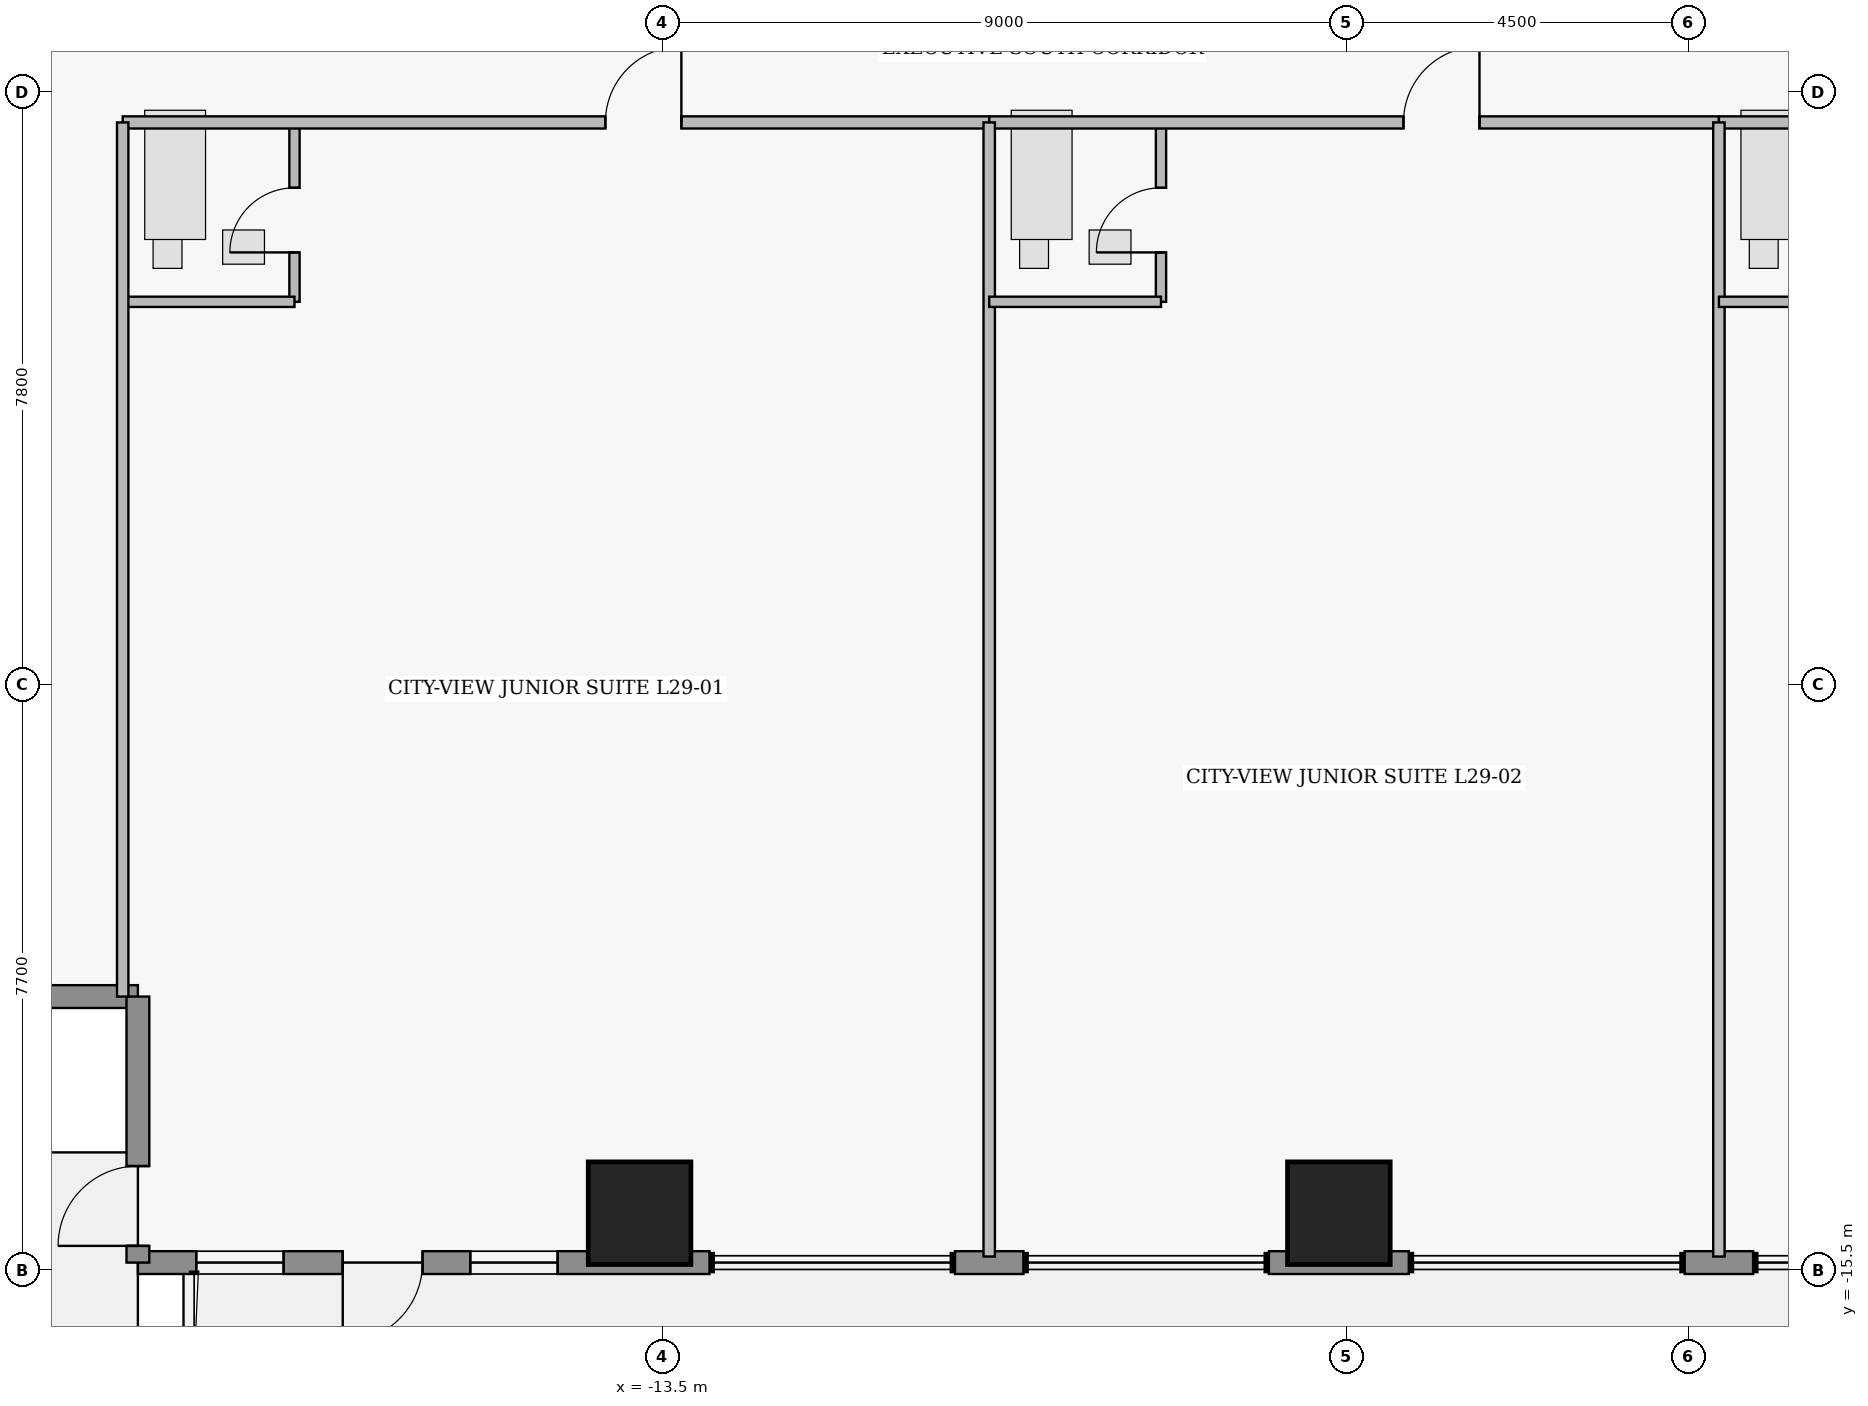
"""IFC4 building model, lengths in metres.
Left out: names, types, materials, properties, quantities, classifications, styles, units other than length and angle.
Written with IfcOpenShell. Run it as: python <this file> out.ifc"""

import sys

from ifc_helpers import new_model, si_unit, direction, frame, frame_2d, origin, origin_2d, place, context, subcontext, project, spatial, rectangle, extrude, element, fill, save


model = new_model("IFC4")
c1 = context("Model", 3, precision=1e-05, world=origin(), true_north=direction((0.0, 1.0)))
c2 = subcontext(c1, "Body", "Model", "MODEL_VIEW")
j1 = project(units=[si_unit("LENGTHUNIT", "METRE"), si_unit("PLANEANGLEUNIT", "RADIAN")], contexts=[c1])
p1 = place(None, origin())
s1 = spatial("IfcSite", under=j1, at=p1, CompositionType="ELEMENT")
p2 = place(p1, origin())
s2 = spatial("IfcBuilding", under=s1, at=p2, CompositionType="ELEMENT")
p3 = place(p2, frame((0.0, 0.0, 117.55)))
s3 = spatial("IfcBuildingStorey", under=s2, at=p3, CompositionType="ELEMENT", Elevation=117.55)
for number, where, z_axis, x_axis in (
    (1, (-13.8, -14.75, 0.0), (0.0, 0.0, 1.0), (1.0, 0.0, 0.0)),
    (2, (-4.6, -14.75, 0.0), (0.0, 0.0, 1.0), (1.0, 0.0, 0.0)),
):
    element("IfcColumn", number, at=place(p3, frame(where, z_axis=z_axis, x_axis=x_axis)), inside=s3, PredefinedType="COLUMN", context=c2, shape_type="SweptSolid", body=[
        extrude(rectangle(XDim=1.35, YDim=1.35, at=origin_2d()), origin(), (0.0, 0.0, 1.0), 3.65),
    ])
p4 = place(p3, frame((-20.4, -11.9, 0.0), z_axis=(0.0, 0.0, 1.0), x_axis=(-1.0, 0.0, 0.0)))
e3 = element("IfcWall", 3, at=p4, inside=s3, PredefinedType="STANDARD", context=c2, shape_type="SweptSolid", body=[
    extrude(rectangle(XDim=3.5, YDim=0.3, at=frame_2d((1.75, 0.0))), origin(), (0.0, 0.0, 1.0), 3.43),
])
p5 = place(p3, frame((0.85, -15.4, 0.0), z_axis=(0.0, 0.0, 1.0), x_axis=(-1.0, 0.0, 0.0)))
e4 = element("IfcWall", 4, at=p5, inside=s3, PredefinedType="STANDARD", context=c2, shape_type="SweptSolid", body=[
    extrude(rectangle(XDim=0.9, YDim=0.3, at=frame_2d((0.45, 0.0))), origin(), (0.0, 0.0, 1.0), 3.43),
])
p6 = place(p3, frame((-3.68, -15.4, 0.0), z_axis=(0.0, 0.0, 1.0), x_axis=(-1.0, 0.0, 0.0)))
e5 = element("IfcWall", 5, at=p6, inside=s3, PredefinedType="STANDARD", context=c2, shape_type="SweptSolid", body=[
    extrude(rectangle(XDim=1.84, YDim=0.3, at=frame_2d((0.92, 0.0))), origin(), (0.0, 0.0, 1.0), 3.43),
])
p7 = place(p3, frame((-8.75, -15.4, 0.0), z_axis=(0.0, 0.0, 1.0), x_axis=(-1.0, 0.0, 0.0)))
e6 = element("IfcWall", 6, at=p7, inside=s3, PredefinedType="STANDARD", context=c2, shape_type="SweptSolid", body=[
    extrude(rectangle(XDim=0.9, YDim=0.3, at=frame_2d((0.45, 0.0))), origin(), (0.0, 0.0, 1.0), 3.43),
])
p8 = place(p3, frame((-12.88, -15.4, 0.0), z_axis=(0.0, 0.0, 1.0), x_axis=(-1.0, 0.0, 0.0)))
e7 = element("IfcWall", 7, at=p8, inside=s3, PredefinedType="STANDARD", context=c2, shape_type="SweptSolid", body=[
    extrude(rectangle(XDim=7.52, YDim=0.3, at=frame_2d((3.76, 0.0))), origin(), (0.0, 0.0, 1.0), 3.43),
])
p9 = place(p8, frame((3.775, 0.0, 0.0)))
e8 = element("IfcOpeningElement", 8, at=p9, cuts=e7, PredefinedType="OPENING", context=c2, shape_type="SweptSolid", body=[
    extrude(rectangle(XDim=1.05, YDim=2.2, at=frame_2d((0.525, 1.1))), frame((0.0, 0.16, 0.0), z_axis=(0.0, -1.0, 0.0), x_axis=(1.0, 0.0, 0.0)), (0.0, 0.0, 1.0), 0.32),
])
p10 = place(p8, frame((1.998, 0.0, 0.95)))
e9 = element("IfcOpeningElement", 9, at=p10, cuts=e7, PredefinedType="OPENING", context=c2, shape_type="SweptSolid", body=[
    extrude(rectangle(XDim=1.15, YDim=1.55, at=frame_2d((0.575, 0.775))), frame((0.0, 0.16, 0.0), z_axis=(0.0, -1.0, 0.0), x_axis=(1.0, 0.0, 0.0)), (0.0, 0.0, 1.0), 0.32),
])
p11 = place(p8, frame((5.603, 0.0, 0.95)))
e10 = element("IfcOpeningElement", 10, at=p11, cuts=e7, PredefinedType="OPENING", context=c2, shape_type="SweptSolid", body=[
    extrude(rectangle(XDim=1.15, YDim=1.55, at=frame_2d((0.575, 0.775))), frame((0.0, 0.16, 0.0), z_axis=(0.0, -1.0, 0.0), x_axis=(1.0, 0.0, 0.0)), (0.0, 0.0, 1.0), 0.32),
])
p12 = place(p3, frame((-20.4, -15.4, 0.0), z_axis=(0.0, 0.0, 1.0), x_axis=(0.0, 1.0, 0.0)))
e11 = element("IfcWall", 11, at=p12, inside=s3, PredefinedType="STANDARD", context=c2, shape_type="SweptSolid", body=[
    extrude(rectangle(XDim=3.5, YDim=0.3, at=frame_2d((1.75, 0.0))), origin(), (0.0, 0.0, 1.0), 3.43),
])
p13 = place(p12, frame((0.22, 0.0, 0.0)))
e12 = element("IfcOpeningElement", 12, at=p13, cuts=e11, PredefinedType="OPENING", context=c2, shape_type="SweptSolid", body=[
    extrude(rectangle(XDim=1.05, YDim=2.2, at=frame_2d((0.525, 1.1))), frame((0.0, 0.16, 0.0), z_axis=(0.0, -1.0, 0.0), x_axis=(1.0, 0.0, 0.0)), (0.0, 0.0, 1.0), 0.32),
])
p14 = place(p3, frame((-18.34, -2.76, 0.0), z_axis=(0.0, 0.0, 1.0), x_axis=(0.0, 1.0, 0.0)))
e13 = element("IfcWall", 13, at=p14, inside=s3, PredefinedType="PLUMBINGWALL", context=c2, shape_type="SweptSolid", body=[
    extrude(rectangle(XDim=2.36, YDim=0.135, at=frame_2d((1.18, 0.0))), origin(), (0.0, 0.0, 1.0), 3.43),
])
p15 = place(p14, frame((0.65, 0.0, 0.0)))
e14 = element("IfcOpeningElement", 14, at=p15, cuts=e13, PredefinedType="OPENING", context=c2, shape_type="SweptSolid", body=[
    extrude(rectangle(XDim=0.85, YDim=2.1, at=frame_2d((0.425, 1.05))), frame((0.0, 0.077, 0.0), z_axis=(0.0, -1.0, 0.0), x_axis=(1.0, 0.0, 0.0)), (0.0, 0.0, 1.0), 0.155),
])
p16 = place(p3, frame((-20.6, -0.4, 0.0), z_axis=(0.0, 0.0, 1.0), x_axis=(1.0, 0.0, 0.0)))
e15 = element("IfcWall", 15, at=p16, inside=s3, PredefinedType="PARTITIONING", context=c2, shape_type="SweptSolid", body=[
    extrude(rectangle(XDim=11.4, YDim=0.16, at=frame_2d((5.7, 0.0))), origin(), (0.0, 0.0, 1.0), 3.43),
])
p17 = place(p16, frame((6.35, 0.0, 0.0)))
e16 = element("IfcOpeningElement", 16, at=p17, cuts=e15, PredefinedType="OPENING", context=c2, shape_type="SweptSolid", body=[
    extrude(rectangle(XDim=1.0, YDim=2.15, at=frame_2d((0.5, 1.075))), frame((0.0, 0.09, 0.0), z_axis=(0.0, -1.0, 0.0), x_axis=(1.0, 0.0, 0.0)), (0.0, 0.0, 1.0), 0.18),
])
p18 = place(p3, frame((-6.94, -2.76, 0.0), z_axis=(0.0, 0.0, 1.0), x_axis=(0.0, 1.0, 0.0)))
e17 = element("IfcWall", 17, at=p18, inside=s3, PredefinedType="PLUMBINGWALL", context=c2, shape_type="SweptSolid", body=[
    extrude(rectangle(XDim=2.36, YDim=0.135, at=frame_2d((1.18, 0.0))), origin(), (0.0, 0.0, 1.0), 3.43),
])
p19 = place(p18, frame((0.65, 0.0, 0.0)))
e18 = element("IfcOpeningElement", 18, at=p19, cuts=e17, PredefinedType="OPENING", context=c2, shape_type="SweptSolid", body=[
    extrude(rectangle(XDim=0.85, YDim=2.1, at=frame_2d((0.425, 1.05))), frame((0.0, 0.077, 0.0), z_axis=(0.0, -1.0, 0.0), x_axis=(1.0, 0.0, 0.0)), (0.0, 0.0, 1.0), 0.155),
])
p20 = place(p3, frame((-9.2, -0.4, 0.0), z_axis=(0.0, 0.0, 1.0), x_axis=(1.0, 0.0, 0.0)))
e19 = element("IfcWall", 19, at=p20, inside=s3, PredefinedType="PARTITIONING", context=c2, shape_type="SweptSolid", body=[
    extrude(rectangle(XDim=9.6, YDim=0.16, at=frame_2d((4.8, 0.0))), origin(), (0.0, 0.0, 1.0), 3.43),
])
p21 = place(p20, frame((5.45, 0.0, 0.0)))
e20 = element("IfcOpeningElement", 20, at=p21, cuts=e19, PredefinedType="OPENING", context=c2, shape_type="SweptSolid", body=[
    extrude(rectangle(XDim=1.0, YDim=2.15, at=frame_2d((0.5, 1.075))), frame((0.0, 0.09, 0.0), z_axis=(0.0, -1.0, 0.0), x_axis=(1.0, 0.0, 0.0)), (0.0, 0.0, 1.0), 0.18),
])
p22 = place(p3, frame((0.4, -0.4, 0.0), z_axis=(0.0, 0.0, 1.0), x_axis=(1.0, 0.0, 0.0)))
e21 = element("IfcWall", 21, at=p22, inside=s3, PredefinedType="PARTITIONING", context=c2, shape_type="SweptSolid", body=[
    extrude(rectangle(XDim=9.4, YDim=0.16, at=frame_2d((4.7, 0.0))), origin(), (0.0, 0.0, 1.0), 3.43),
])
p23 = place(p22, frame((5.35, 0.0, 0.0)))
e22 = element("IfcOpeningElement", 22, at=p23, cuts=e21, PredefinedType="OPENING", context=c2, shape_type="SweptSolid", body=[
    extrude(rectangle(XDim=1.0, YDim=2.15, at=frame_2d((0.5, 1.075))), frame((0.0, 0.09, 0.0), z_axis=(0.0, -1.0, 0.0), x_axis=(1.0, 0.0, 0.0)), (0.0, 0.0, 1.0), 0.18),
])
p24 = place(p3, frame((-20.6, -2.76, 0.0), z_axis=(0.0, 0.0, 1.0), x_axis=(1.0, 0.0, 0.0)))
e23 = element("IfcWall", 23, at=p24, inside=s3, PredefinedType="PLUMBINGWALL", context=c2, shape_type="SweptSolid", body=[
    extrude(rectangle(XDim=2.26, YDim=0.135, at=frame_2d((1.13, 0.0))), origin(), (0.0, 0.0, 1.0), 3.43),
])
p25 = place(p3, frame((-20.6, -11.9, 0.0), z_axis=(0.0, 0.0, 1.0), x_axis=(0.0, 1.0, 0.0)))
e24 = element("IfcWall", 24, at=p25, inside=s3, PredefinedType="PARTITIONING", context=c2, shape_type="SweptSolid", body=[
    extrude(rectangle(XDim=11.5, YDim=0.15, at=frame_2d((5.75, 0.0))), origin(), (0.0, 0.0, 1.0), 3.43),
])
p26 = place(p3, frame((-9.2, -15.32, 0.0), z_axis=(0.0, 0.0, 1.0), x_axis=(0.0, 1.0, 0.0)))
e25 = element("IfcWall", 25, at=p26, inside=s3, PredefinedType="PARTITIONING", context=c2, shape_type="SweptSolid", body=[
    extrude(rectangle(XDim=14.92, YDim=0.15, at=frame_2d((7.46, 0.0))), origin(), (0.0, 0.0, 1.0), 3.43),
])
p27 = place(p3, frame((-9.2, -2.76, 0.0), z_axis=(0.0, 0.0, 1.0), x_axis=(1.0, 0.0, 0.0)))
e26 = element("IfcWall", 26, at=p27, inside=s3, PredefinedType="PLUMBINGWALL", context=c2, shape_type="SweptSolid", body=[
    extrude(rectangle(XDim=2.26, YDim=0.135, at=frame_2d((1.13, 0.0))), origin(), (0.0, 0.0, 1.0), 3.43),
])
p28 = place(p3, frame((0.4, -15.32, 0.0), z_axis=(0.0, 0.0, 1.0), x_axis=(0.0, 1.0, 0.0)))
e27 = element("IfcWall", 27, at=p28, inside=s3, PredefinedType="PARTITIONING", context=c2, shape_type="SweptSolid", body=[
    extrude(rectangle(XDim=14.92, YDim=0.15, at=frame_2d((7.46, 0.0))), origin(), (0.0, 0.0, 1.0), 3.43),
])
p29 = place(p3, frame((0.4, -2.76, 0.0), z_axis=(0.0, 0.0, 1.0), x_axis=(1.0, 0.0, 0.0)))
e28 = element("IfcWall", 28, at=p29, inside=s3, PredefinedType="PLUMBINGWALL", context=c2, shape_type="SweptSolid", body=[
    extrude(rectangle(XDim=2.26, YDim=0.135, at=frame_2d((1.13, 0.0))), origin(), (0.0, 0.0, 1.0), 3.43),
])
p30 = place(p9, origin())
e29 = element("IfcDoor", 29, at=p30, inside=s3, OperationType="SINGLE_SWING_RIGHT", PredefinedType="DOOR", context=c2, shape_type="SweptSolid", body=[
    extrude(rectangle(XDim=1.05, YDim=2.2, at=frame_2d((0.525, 1.1))), frame((0.0, 0.025, 0.0), z_axis=(0.0, -1.0, 0.0), x_axis=(1.0, 0.0, 0.0)), (0.0, 0.0, 1.0), 0.05),
])
fill(e8, e29)
p31 = place(p10, origin())
e30 = element("IfcWindow", 30, at=p31, inside=s3, PartitioningType="SINGLE_PANEL", PredefinedType="WINDOW", context=c2, shape_type="SweptSolid", body=[
    extrude(rectangle(XDim=1.15, YDim=1.55, at=frame_2d((0.575, 0.775))), frame((0.0, 0.03, 0.0), z_axis=(0.0, -1.0, 0.0), x_axis=(1.0, 0.0, 0.0)), (0.0, 0.0, 1.0), 0.06),
])
fill(e9, e30)
p32 = place(p11, origin())
e31 = element("IfcWindow", 31, at=p32, inside=s3, PartitioningType="SINGLE_PANEL", PredefinedType="WINDOW", context=c2, shape_type="SweptSolid", body=[
    extrude(rectangle(XDim=1.15, YDim=1.55, at=frame_2d((0.575, 0.775))), frame((0.0, 0.03, 0.0), z_axis=(0.0, -1.0, 0.0), x_axis=(1.0, 0.0, 0.0)), (0.0, 0.0, 1.0), 0.06),
])
fill(e10, e31)
p33 = place(p13, origin())
e32 = element("IfcDoor", 32, at=p33, inside=s3, OperationType="SINGLE_SWING_LEFT", PredefinedType="DOOR", context=c2, shape_type="SweptSolid", body=[
    extrude(rectangle(XDim=1.05, YDim=2.2, at=frame_2d((0.525, 1.1))), frame((0.0, 0.025, 0.0), z_axis=(0.0, -1.0, 0.0), x_axis=(1.0, 0.0, 0.0)), (0.0, 0.0, 1.0), 0.05),
])
fill(e12, e32)
p34 = place(p15, origin())
e33 = element("IfcDoor", 33, at=p34, inside=s3, OperationType="SINGLE_SWING_LEFT", PredefinedType="DOOR", context=c2, shape_type="SweptSolid", body=[
    extrude(rectangle(XDim=0.85, YDim=2.1, at=frame_2d((0.425, 1.05))), frame((0.0, 0.025, 0.0), z_axis=(0.0, -1.0, 0.0), x_axis=(1.0, 0.0, 0.0)), (0.0, 0.0, 1.0), 0.05),
])
fill(e14, e33)
p35 = place(p17, origin())
e34 = element("IfcDoor", 34, at=p35, inside=s3, OperationType="SINGLE_SWING_RIGHT", PredefinedType="DOOR", context=c2, shape_type="SweptSolid", body=[
    extrude(rectangle(XDim=1.0, YDim=2.15, at=frame_2d((0.5, 1.075))), frame((0.0, 0.025, 0.0), z_axis=(0.0, -1.0, 0.0), x_axis=(1.0, 0.0, 0.0)), (0.0, 0.0, 1.0), 0.05),
])
fill(e16, e34)
p36 = place(p19, origin())
e35 = element("IfcDoor", 35, at=p36, inside=s3, OperationType="SINGLE_SWING_LEFT", PredefinedType="DOOR", context=c2, shape_type="SweptSolid", body=[
    extrude(rectangle(XDim=0.85, YDim=2.1, at=frame_2d((0.425, 1.05))), frame((0.0, 0.025, 0.0), z_axis=(0.0, -1.0, 0.0), x_axis=(1.0, 0.0, 0.0)), (0.0, 0.0, 1.0), 0.05),
])
fill(e18, e35)
p37 = place(p21, origin())
e36 = element("IfcDoor", 36, at=p37, inside=s3, OperationType="SINGLE_SWING_RIGHT", PredefinedType="DOOR", context=c2, shape_type="SweptSolid", body=[
    extrude(rectangle(XDim=1.0, YDim=2.15, at=frame_2d((0.5, 1.075))), frame((0.0, 0.025, 0.0), z_axis=(0.0, -1.0, 0.0), x_axis=(1.0, 0.0, 0.0)), (0.0, 0.0, 1.0), 0.05),
])
fill(e20, e36)
save(model, sys.argv[1])
